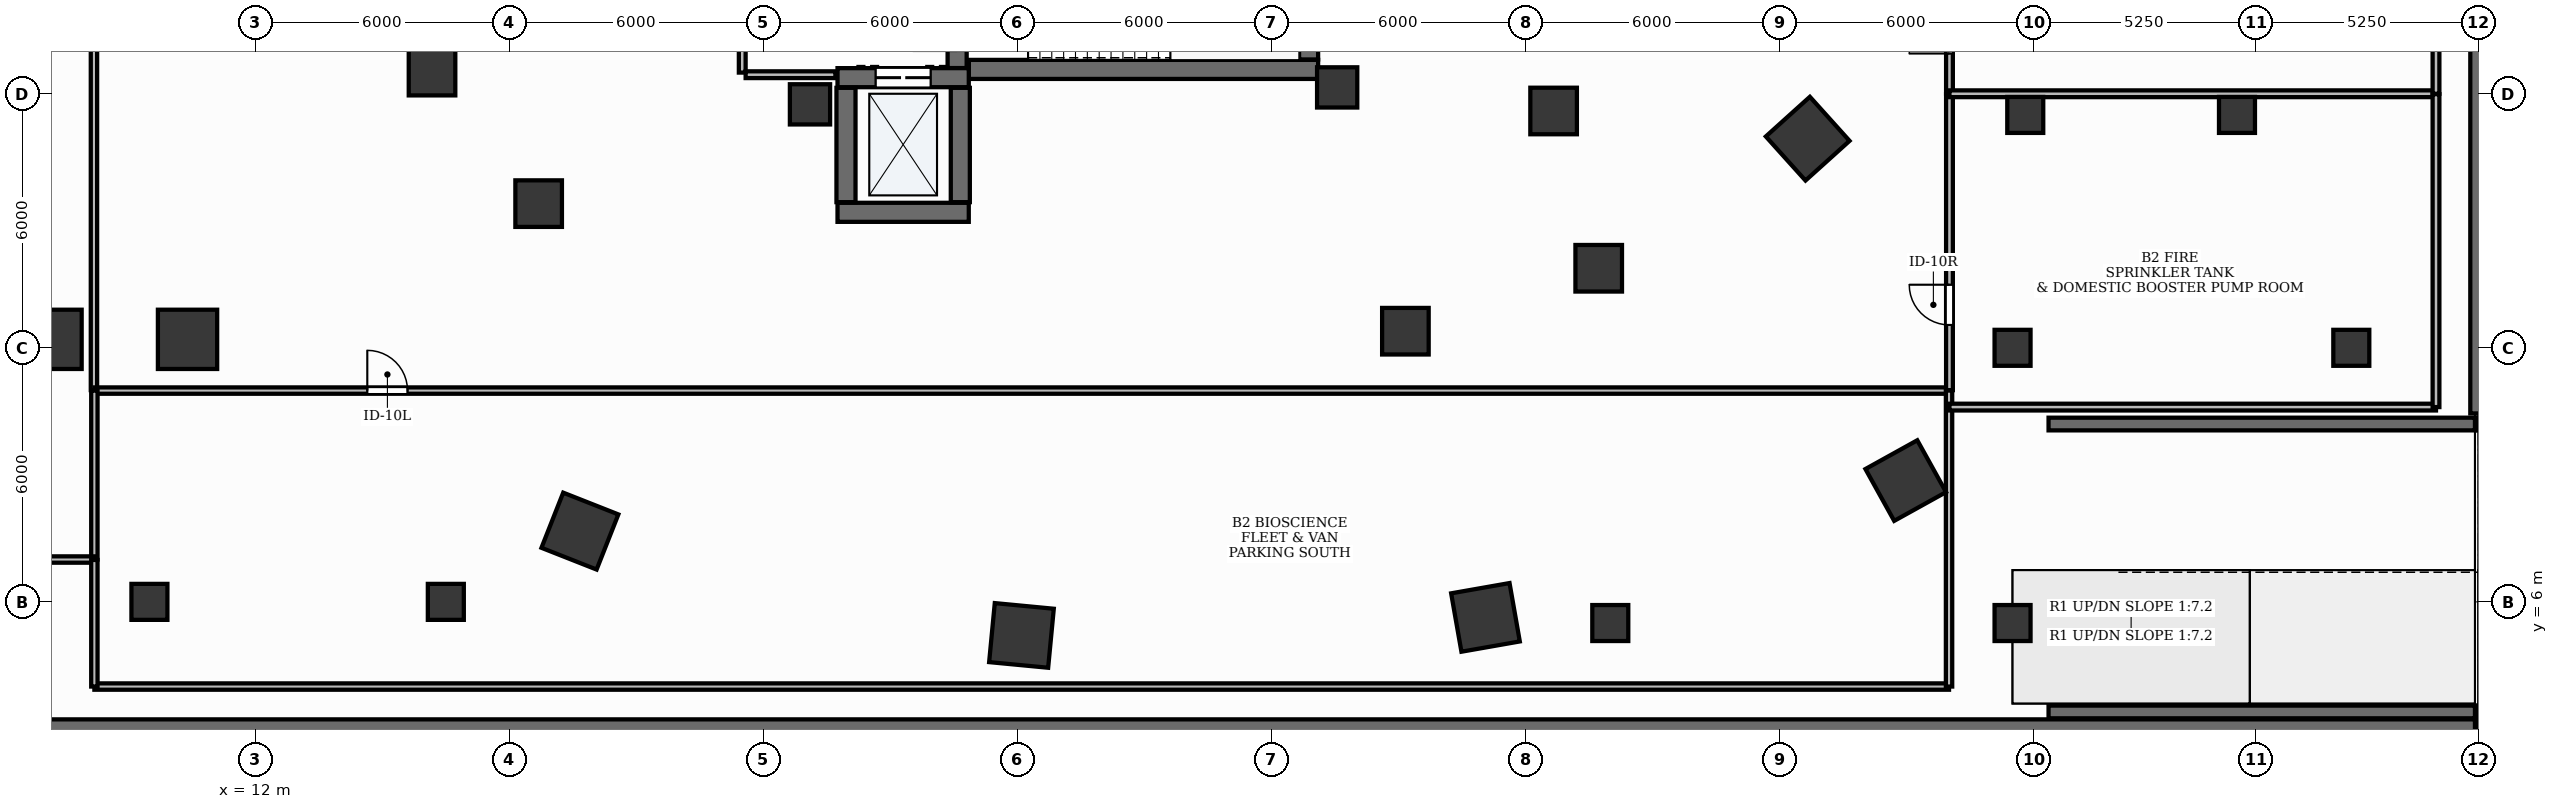
"""IFC4 building model, lengths in metres.
Left out: names, types, materials, properties, quantities, classifications, styles, units other than length and angle.
Written with IfcOpenShell. Run it as: python <this file> out.ifc"""

import sys

from ifc_helpers import new_model, si_unit, direction, frame, frame_2d, origin, origin_2d, place, context, subcontext, project, spatial, rectangle, extrude, element, fill, save


model = new_model("IFC4")
c1 = context("Model", 3, precision=1e-05, world=origin(), true_north=direction((0.0, 1.0)))
c2 = subcontext(c1, "Body", "Model", "MODEL_VIEW")
j1 = project(units=[si_unit("LENGTHUNIT", "METRE"), si_unit("PLANEANGLEUNIT", "RADIAN")], contexts=[c1])
p1 = place(None, origin())
s1 = spatial("IfcSite", under=j1, at=p1, CompositionType="ELEMENT")
p2 = place(p1, origin())
s2 = spatial("IfcBuilding", under=s1, at=p2, CompositionType="ELEMENT")
p3 = place(p2, frame((0.0, 0.0, -9.0)))
s3 = spatial("IfcBuildingStorey", under=s2, at=p3, CompositionType="ELEMENT", Elevation=-9.0)
p4 = place(p3, frame((64.42, 3.0, 0.0), z_axis=(0.0, 0.0, 1.0), x_axis=(-1.0, 0.0, 0.0)))
e1 = element("IfcWall", 1, at=p4, inside=s3, PredefinedType="USERDEFINED", context=c2, shape_type="SweptSolid", body=[
    extrude(rectangle(XDim=62.17, YDim=0.45, at=frame_2d((31.085, 0.0))), origin(), (0.0, 0.0, 1.0), 4.18),
])
for number, where, z_axis, x_axis in (
    (2, (54.35, 10.2, 0.0), (0.0, 0.0, 1.0), (1.0, 0.0, 0.0)),
    (3, (54.35, 3.4, 0.0), (0.0, 0.0, 1.0), (1.0, 0.0, 0.0)),
):
    element("IfcWall", number, at=place(p3, frame(where, z_axis=z_axis, x_axis=x_axis)), inside=s3, PredefinedType="SHEAR", context=c2, shape_type="SweptSolid", body=[
        extrude(rectangle(XDim=10.07, YDim=0.3, at=frame_2d((5.035, 0.0))), origin(), (0.0, 0.0, 1.0), 4.5),
    ])
for number, where, z_axis, x_axis in (
    (4, (9.5, 6.0, 0.0), (0.0, 0.0, 1.0), (1.0, 0.0, 0.0)),
    (5, (16.5, 6.0, 0.0), (0.0, 0.0, 1.0), (1.0, 0.0, 0.0)),
    (6, (44.0, 5.5, 0.0), (0.0, 0.0, 1.0), (1.0, 0.0, 0.0)),
    (7, (53.5, 5.5, 0.0), (0.0, 0.0, 1.0), (1.0, 0.0, 0.0)),
    (8, (53.5, 12.0, 0.0), (0.0, 0.0, 1.0), (1.0, 0.0, 0.0)),
    (9, (61.5, 12.0, 0.0), (0.0, 0.0, 1.0), (1.0, 0.0, 0.0)),
):
    element("IfcColumn", number, at=place(p3, frame(where, z_axis=z_axis, x_axis=x_axis)), inside=s3, PredefinedType="COLUMN", context=c2, shape_type="SweptSolid", body=[
        extrude(rectangle(XDim=0.85, YDim=0.85, at=origin_2d()), origin(), (0.0, 0.0, 1.0), 4.18),
    ])
p5 = place(p3, frame((28.852, 18.575, 0.0), z_axis=(0.0, 0.0, 1.0), x_axis=(1.0, 0.0, 0.0)))
e10 = element("IfcWall", 10, at=p5, inside=s3, PredefinedType="SHEAR", context=c2, shape_type="SweptSolid", body=[
    extrude(rectangle(XDim=8.248, YDim=0.45, at=frame_2d((4.124, 0.0))), origin(), (0.0, 0.0, 1.0), 4.18),
])
p6 = place(p3, frame((36.875, 18.81, 0.0), z_axis=(0.0, 0.0, 1.0), x_axis=(0.0, 1.0, 0.0)))
e11 = element("IfcWall", 11, at=p6, inside=s3, PredefinedType="SHEAR", context=c2, shape_type="SweptSolid", body=[
    extrude(rectangle(XDim=3.08, YDim=0.45, at=frame_2d((1.54, 0.0))), origin(), (0.0, 0.0, 1.0), 4.18),
])
p7 = place(p3, frame((28.575, 18.607, 0.0), z_axis=(0.0, 0.0, 1.0), x_axis=(0.0, 1.0, 0.0)))
e12 = element("IfcWall", 12, at=p7, inside=s3, PredefinedType="SHEAR", context=c2, shape_type="SweptSolid", body=[
    extrude(rectangle(XDim=3.283, YDim=0.45, at=frame_2d((1.642, 0.0))), origin(), (0.0, 0.0, 1.0), 4.18),
])
p8 = place(p7, frame((0.403, 0.0, 0.0)))
e13 = element("IfcOpeningElement", 13, at=p8, cuts=e12, PredefinedType="OPENING", context=c2, shape_type="SweptSolid", body=[
    extrude(rectangle(XDim=1.05, YDim=2.15, at=frame_2d((0.525, 1.075))), frame((0.0, 0.24, 0.0), z_axis=(0.0, -1.0, 0.0), x_axis=(1.0, 0.0, 0.0)), (0.0, 0.0, 1.0), 0.48),
])
p9 = place(p3, frame((25.75, 15.2, 0.0), z_axis=(0.0, 0.0, 1.0), x_axis=(1.0, 0.0, 0.0)))
e14 = element("IfcWall", 14, at=p9, inside=s3, PredefinedType="SHEAR", context=c2, shape_type="SweptSolid", body=[
    extrude(rectangle(XDim=3.1, YDim=0.45, at=frame_2d((1.55, 0.0))), origin(), (0.0, 0.0, 1.0), 4.18),
])
p10 = place(p3, frame((25.75, 18.38, 0.0), z_axis=(0.0, 0.0, 1.0), x_axis=(1.0, 0.0, 0.0)))
e15 = element("IfcWall", 15, at=p10, inside=s3, PredefinedType="SHEAR", context=c2, shape_type="SweptSolid", body=[
    extrude(rectangle(XDim=3.1, YDim=0.45, at=frame_2d((1.55, 0.0))), origin(), (0.0, 0.0, 1.0), 4.18),
])
p11 = place(p10, frame((0.9, 0.0, 0.0)))
e16 = element("IfcOpeningElement", 16, at=p11, cuts=e15, PredefinedType="OPENING", context=c2, shape_type="SweptSolid", body=[
    extrude(rectangle(XDim=1.3, YDim=2.2, at=frame_2d((0.65, 1.1))), frame((0.0, 0.24, 0.0), z_axis=(0.0, -1.0, 0.0), x_axis=(1.0, 0.0, 0.0)), (0.0, 0.0, 1.0), 0.48),
])
for number, where, z_axis, x_axis in (
    (17, (25.95, 15.44, 0.0), (0.0, 0.0, 1.0), (0.0, 1.0, 0.0)),
    (18, (28.65, 15.44, 0.0), (0.0, 0.0, 1.0), (0.0, 1.0, 0.0)),
):
    element("IfcWall", number, at=place(p3, frame(where, z_axis=z_axis, x_axis=x_axis)), inside=s3, PredefinedType="SHEAR", context=c2, shape_type="SweptSolid", body=[
        extrude(rectangle(XDim=2.7, YDim=0.45, at=frame_2d((1.35, 0.0))), origin(), (0.0, 0.0, 1.0), 4.18),
    ])
for number, where, z_axis, x_axis in (
    (19, (25.1, 17.75, 0.0), (0.0, 0.0, 1.0), (1.0, 0.0, 0.0)),
    (20, (37.55, 18.15, 0.0), (0.0, 0.0, 1.0), (1.0, 0.0, 0.0)),
):
    element("IfcColumn", number, at=place(p3, frame(where, z_axis=z_axis, x_axis=x_axis)), inside=s3, PredefinedType="PILASTER", context=c2, shape_type="SweptSolid", body=[
        extrude(rectangle(XDim=0.95, YDim=0.95, at=origin_2d()), origin(), (0.0, 0.0, 1.0), 4.18),
    ])
for number, where, z_axis, x_axis in (
    (21, (7.2, 12.2, 0.0), (0.0, 0.0, 1.0), (1.0, 0.0, 0.0)),
    (22, (10.4, 12.2, 0.0), (0.0, 0.0, 1.0), (1.0, 0.0, 0.0)),
    (23, (19.667, 7.671, 0.0), (0.0, 0.0, 1.0), (-0.93, 0.367, 0.0)),
    (24, (30.094, 5.208, 0.0), (0.0, 0.0, 1.0), (-0.995, 0.095, 0.0)),
    (25, (41.052, 5.633, 0.0), (0.0, 0.0, 1.0), (0.985, 0.173, 0.0)),
    (26, (50.977, 8.865, 0.0), (0.0, 0.0, 1.0), (0.875, 0.485, 0.0)),
    (27, (48.662, 16.939, 0.0), (0.0, 0.0, 1.0), (-0.669, 0.743, 0.0)),
):
    element("IfcColumn", number, at=place(p3, frame(where, z_axis=z_axis, x_axis=x_axis)), inside=s3, PredefinedType="COLUMN", context=c2, shape_type="SweptSolid", body=[
        extrude(rectangle(XDim=1.4, YDim=1.4, at=origin_2d()), origin(), (0.0, 0.0, 1.0), 4.18),
    ])
for number, where, z_axis, x_axis in (
    (28, (16.174, 18.511, 0.0), (0.0, 0.0, 1.0), (1.0, 0.0, 0.0)),
    (29, (18.692, 15.405, 0.0), (0.0, 0.0, 1.0), (1.0, 0.0, 0.0)),
    (30, (39.161, 12.392, 0.0), (0.0, 0.0, 1.0), (1.0, 0.0, 0.0)),
    (31, (43.727, 13.879, 0.0), (0.0, 0.0, 1.0), (1.0, 0.0, 0.0)),
    (32, (42.662, 17.593, 0.0), (0.0, 0.0, 1.0), (1.0, 0.0, 0.0)),
):
    element("IfcColumn", number, at=place(p3, frame(where, z_axis=z_axis, x_axis=x_axis)), inside=s3, PredefinedType="COLUMN", context=c2, shape_type="SweptSolid", body=[
        extrude(rectangle(XDim=1.1, YDim=1.1, at=origin_2d()), origin(), (0.0, 0.0, 1.0), 4.18),
    ])
p12 = place(p3, frame((64.5, 10.45, 0.0), z_axis=(0.0, 0.0, 1.0), x_axis=(0.0, 1.0, 0.0)))
e33 = element("IfcWall", 33, at=p12, inside=s3, PredefinedType="SHEAR", context=c2, shape_type="SweptSolid", body=[
    extrude(rectangle(XDim=36.3, YDim=0.38, at=frame_2d((18.15, 0.0))), origin(), (0.0, 0.0, 1.0), 4.18),
])
for number, where, z_axis, x_axis in (
    (34, (58.8, 17.5, 0.0), (0.0, 0.0, 1.0), (1.0, 0.0, 0.0)),
    (35, (53.8, 17.5, 0.0), (0.0, 0.0, 1.0), (1.0, 0.0, 0.0)),
):
    element("IfcColumn", number, at=place(p3, frame(where, z_axis=z_axis, x_axis=x_axis)), inside=s3, PredefinedType="COLUMN", context=c2, shape_type="SweptSolid", body=[
        extrude(rectangle(XDim=0.85, YDim=0.85, at=origin_2d()), origin(), (0.0, 0.0, 1.0), 4.18),
    ])
p13 = place(p3, frame((23.5, 18.5, 0.0), z_axis=(0.0, 0.0, 1.0), x_axis=(0.0, 1.0, 0.0)))
e36 = element("IfcWall", 36, at=p13, inside=s3, PredefinedType="PARTITIONING", context=c2, shape_type="SweptSolid", body=[
    extrude(rectangle(XDim=3.4, YDim=0.16, at=frame_2d((1.7, 0.0))), origin(), (0.0, 0.0, 1.0), 3.04),
])
p14 = place(p13, frame((1.175, 0.0, 0.0)))
e37 = element("IfcOpeningElement", 37, at=p14, cuts=e36, PredefinedType="OPENING", context=c2, shape_type="SweptSolid", body=[
    extrude(rectangle(XDim=1.05, YDim=2.15, at=frame_2d((0.525, 1.075))), frame((0.0, 0.095, 0.0), z_axis=(0.0, -1.0, 0.0), x_axis=(1.0, 0.0, 0.0)), (0.0, 0.0, 1.0), 0.19),
])
p15 = place(p3, frame((23.58, 18.45, 0.0), z_axis=(0.0, 0.0, 1.0), x_axis=(1.0, 0.0, 0.0)))
e38 = element("IfcWall", 38, at=p15, inside=s3, PredefinedType="PARTITIONING", context=c2, shape_type="SweptSolid", body=[
    extrude(rectangle(XDim=2.12, YDim=0.16, at=frame_2d((1.06, 0.0))), origin(), (0.0, 0.0, 1.0), 3.04),
])
p16 = place(p3, frame((8.19, 42.0, 0.0), z_axis=(0.0, 0.0, 1.0), x_axis=(0.0, -1.0, 0.0)))
e39 = element("IfcWall", 39, at=p16, inside=s3, PredefinedType="PARTITIONING", context=c2, shape_type="SweptSolid", body=[
    extrude(rectangle(XDim=31.0, YDim=0.15, at=frame_2d((15.5, 0.0))), origin(), (0.0, 0.0, 1.0), 3.04),
])
p17 = place(p16, frame((3.681, 0.0, 0.0)))
e40 = element("IfcOpeningElement", 40, at=p17, cuts=e39, PredefinedType="OPENING", context=c2, shape_type="SweptSolid", body=[
    extrude(rectangle(XDim=0.95, YDim=2.15, at=frame_2d((0.475, 1.075))), frame((0.0, 0.09, 0.0), z_axis=(0.0, -1.0, 0.0), x_axis=(1.0, 0.0, 0.0)), (0.0, 0.0, 1.0), 0.18),
])
p18 = place(p3, frame((8.21, 10.99, 0.0), z_axis=(0.0, 0.0, 1.0), x_axis=(1.0, 0.0, 0.0)))
e41 = element("IfcWall", 41, at=p18, inside=s3, PredefinedType="PARTITIONING", context=c2, shape_type="SweptSolid", body=[
    extrude(rectangle(XDim=43.79, YDim=0.15, at=frame_2d((21.895, 0.0))), origin(), (0.0, 0.0, 1.0), 3.04),
])
p19 = place(p18, frame((6.435, 0.0, 0.0)))
e42 = element("IfcOpeningElement", 42, at=p19, cuts=e41, PredefinedType="OPENING", context=c2, shape_type="SweptSolid", body=[
    extrude(rectangle(XDim=0.95, YDim=2.15, at=frame_2d((0.475, 1.075))), frame((0.0, 0.09, 0.0), z_axis=(0.0, -1.0, 0.0), x_axis=(1.0, 0.0, 0.0)), (0.0, 0.0, 1.0), 0.18),
])
p20 = place(p3, frame((52.01, 18.0, 0.0), z_axis=(0.0, 0.0, 1.0), x_axis=(0.0, 1.0, 0.0)))
e43 = element("IfcWall", 43, at=p20, inside=s3, PredefinedType="PARTITIONING", context=c2, shape_type="SweptSolid", body=[
    extrude(rectangle(XDim=15.99, YDim=0.16, at=frame_2d((7.995, 0.0))), origin(), (0.0, 0.0, 1.0), 3.04),
])
p21 = place(p20, frame((0.95, 0.0, 0.0)))
e44 = element("IfcOpeningElement", 44, at=p21, cuts=e43, PredefinedType="OPENING", context=c2, shape_type="SweptSolid", body=[
    extrude(rectangle(XDim=0.95, YDim=2.15, at=frame_2d((0.475, 1.075))), frame((0.0, 0.095, 0.0), z_axis=(0.0, -1.0, 0.0), x_axis=(1.0, 0.0, 0.0)), (0.0, 0.0, 1.0), 0.19),
])
p22 = place(p3, frame((52.01, 11.0, 0.0), z_axis=(0.0, 0.0, 1.0), x_axis=(0.0, 1.0, 0.0)))
e45 = element("IfcWall", 45, at=p22, inside=s3, PredefinedType="PARTITIONING", context=c2, shape_type="SweptSolid", body=[
    extrude(rectangle(XDim=6.99, YDim=0.16, at=frame_2d((3.495, 0.0))), origin(), (0.0, 0.0, 1.0), 3.04),
])
p23 = place(p22, frame((1.54, 0.0, 0.0)))
e46 = element("IfcOpeningElement", 46, at=p23, cuts=e45, PredefinedType="OPENING", context=c2, shape_type="SweptSolid", body=[
    extrude(rectangle(XDim=0.95, YDim=2.15, at=frame_2d((0.475, 1.075))), frame((0.0, 0.095, 0.0), z_axis=(0.0, -1.0, 0.0), x_axis=(1.0, 0.0, 0.0)), (0.0, 0.0, 1.0), 0.19),
])
p24 = place(p3, frame((8.2, 10.99, 0.0), z_axis=(0.0, 0.0, 1.0), x_axis=(0.0, -1.0, 0.0)))
e47 = element("IfcWall", 47, at=p24, inside=s3, PredefinedType="PARTITIONING", context=c2, shape_type="SweptSolid", body=[
    extrude(rectangle(XDim=3.99, YDim=0.15, at=frame_2d((1.995, 0.0))), origin(), (0.0, 0.0, 1.0), 3.04),
])
p25 = place(p3, frame((8.2, 7.0, 0.0), z_axis=(0.0, 0.0, 1.0), x_axis=(-1.0, 0.0, 0.0)))
e48 = element("IfcWall", 48, at=p25, inside=s3, PredefinedType="PARTITIONING", context=c2, shape_type="SweptSolid", body=[
    extrude(rectangle(XDim=5.2, YDim=0.15, at=frame_2d((2.6, 0.0))), origin(), (0.0, 0.0, 1.0), 3.04),
])
p26 = place(p3, frame((52.0, 4.0, 0.0), z_axis=(0.0, 0.0, 1.0), x_axis=(-1.0, 0.0, 0.0)))
e49 = element("IfcWall", 49, at=p26, inside=s3, PredefinedType="PARTITIONING", context=c2, shape_type="SweptSolid", body=[
    extrude(rectangle(XDim=43.8, YDim=0.15, at=frame_2d((21.9, 0.0))), origin(), (0.0, 0.0, 1.0), 3.04),
])
p27 = place(p3, frame((8.2, 4.0, 0.0), z_axis=(0.0, 0.0, 1.0), x_axis=(0.0, 1.0, 0.0)))
e50 = element("IfcWall", 50, at=p27, inside=s3, PredefinedType="PARTITIONING", context=c2, shape_type="SweptSolid", body=[
    extrude(rectangle(XDim=2.99, YDim=0.15, at=frame_2d((1.495, 0.0))), origin(), (0.0, 0.0, 1.0), 3.04),
])
p28 = place(p3, frame((52.0, 10.99, 0.0), z_axis=(0.0, 0.0, 1.0), x_axis=(0.0, -1.0, 0.0)))
e51 = element("IfcWall", 51, at=p28, inside=s3, PredefinedType="PARTITIONING", context=c2, shape_type="SweptSolid", body=[
    extrude(rectangle(XDim=6.99, YDim=0.15, at=frame_2d((3.495, 0.0))), origin(), (0.0, 0.0, 1.0), 3.04),
])
p29 = place(p3, frame((63.5, 18.0, 0.0), z_axis=(0.0, 0.0, 1.0), x_axis=(-1.0, 0.0, 0.0)))
e52 = element("IfcWall", 52, at=p29, inside=s3, PredefinedType="PARTITIONING", context=c2, shape_type="SweptSolid", body=[
    extrude(rectangle(XDim=11.49, YDim=0.16, at=frame_2d((5.745, 0.0))), origin(), (0.0, 0.0, 1.0), 3.04),
])
p30 = place(p3, frame((63.5, 33.99, 0.0), z_axis=(0.0, 0.0, 1.0), x_axis=(0.0, -1.0, 0.0)))
e53 = element("IfcWall", 53, at=p30, inside=s3, PredefinedType="PARTITIONING", context=c2, shape_type="SweptSolid", body=[
    extrude(rectangle(XDim=15.99, YDim=0.16, at=frame_2d((7.995, 0.0))), origin(), (0.0, 0.0, 1.0), 3.04),
])
p31 = place(p3, frame((63.5, 10.6, 0.0), z_axis=(0.0, 0.0, 1.0), x_axis=(-1.0, 0.0, 0.0)))
e54 = element("IfcWall", 54, at=p31, inside=s3, PredefinedType="PARTITIONING", context=c2, shape_type="SweptSolid", body=[
    extrude(rectangle(XDim=11.49, YDim=0.16, at=frame_2d((5.745, 0.0))), origin(), (0.0, 0.0, 1.0), 3.04),
])
p32 = place(p3, frame((63.5, 17.99, 0.0), z_axis=(0.0, 0.0, 1.0), x_axis=(0.0, -1.0, 0.0)))
e55 = element("IfcWall", 55, at=p32, inside=s3, PredefinedType="PARTITIONING", context=c2, shape_type="SweptSolid", body=[
    extrude(rectangle(XDim=7.39, YDim=0.16, at=frame_2d((3.695, 0.0))), origin(), (0.0, 0.0, 1.0), 3.04),
])
p33 = place(p11, origin())
e56 = element("IfcDoor", 56, at=p33, inside=s3, OperationType="DOUBLE_DOOR_SLIDING", PredefinedType="DOOR", context=c2, shape_type="SweptSolid", body=[
    extrude(rectangle(XDim=1.3, YDim=2.2, at=frame_2d((0.65, 1.1))), frame((0.0, 0.025, 0.0), z_axis=(0.0, -1.0, 0.0), x_axis=(1.0, 0.0, 0.0)), (0.0, 0.0, 1.0), 0.05),
])
fill(e16, e56)
p34 = place(p19, origin())
e57 = element("IfcDoor", 57, at=p34, inside=s3, OperationType="SINGLE_SWING_LEFT", PredefinedType="DOOR", context=c2, shape_type="SweptSolid", body=[
    extrude(rectangle(XDim=0.95, YDim=2.15, at=frame_2d((0.475, 1.075))), frame((0.0, 0.025, 0.0), z_axis=(0.0, -1.0, 0.0), x_axis=(1.0, 0.0, 0.0)), (0.0, 0.0, 1.0), 0.05),
])
fill(e42, e57)
p35 = place(p21, origin())
e58 = element("IfcDoor", 58, at=p35, inside=s3, OperationType="SINGLE_SWING_LEFT", PredefinedType="DOOR", context=c2, shape_type="SweptSolid", body=[
    extrude(rectangle(XDim=0.95, YDim=2.15, at=frame_2d((0.475, 1.075))), frame((0.0, 0.025, 0.0), z_axis=(0.0, -1.0, 0.0), x_axis=(1.0, 0.0, 0.0)), (0.0, 0.0, 1.0), 0.05),
])
fill(e44, e58)
p36 = place(p23, origin())
e59 = element("IfcDoor", 59, at=p36, inside=s3, OperationType="SINGLE_SWING_RIGHT", PredefinedType="DOOR", context=c2, shape_type="SweptSolid", body=[
    extrude(rectangle(XDim=0.95, YDim=2.15, at=frame_2d((0.475, 1.075))), frame((0.0, 0.025, 0.0), z_axis=(0.0, -1.0, 0.0), x_axis=(1.0, 0.0, 0.0)), (0.0, 0.0, 1.0), 0.05),
])
fill(e46, e59)
save(model, sys.argv[1])
